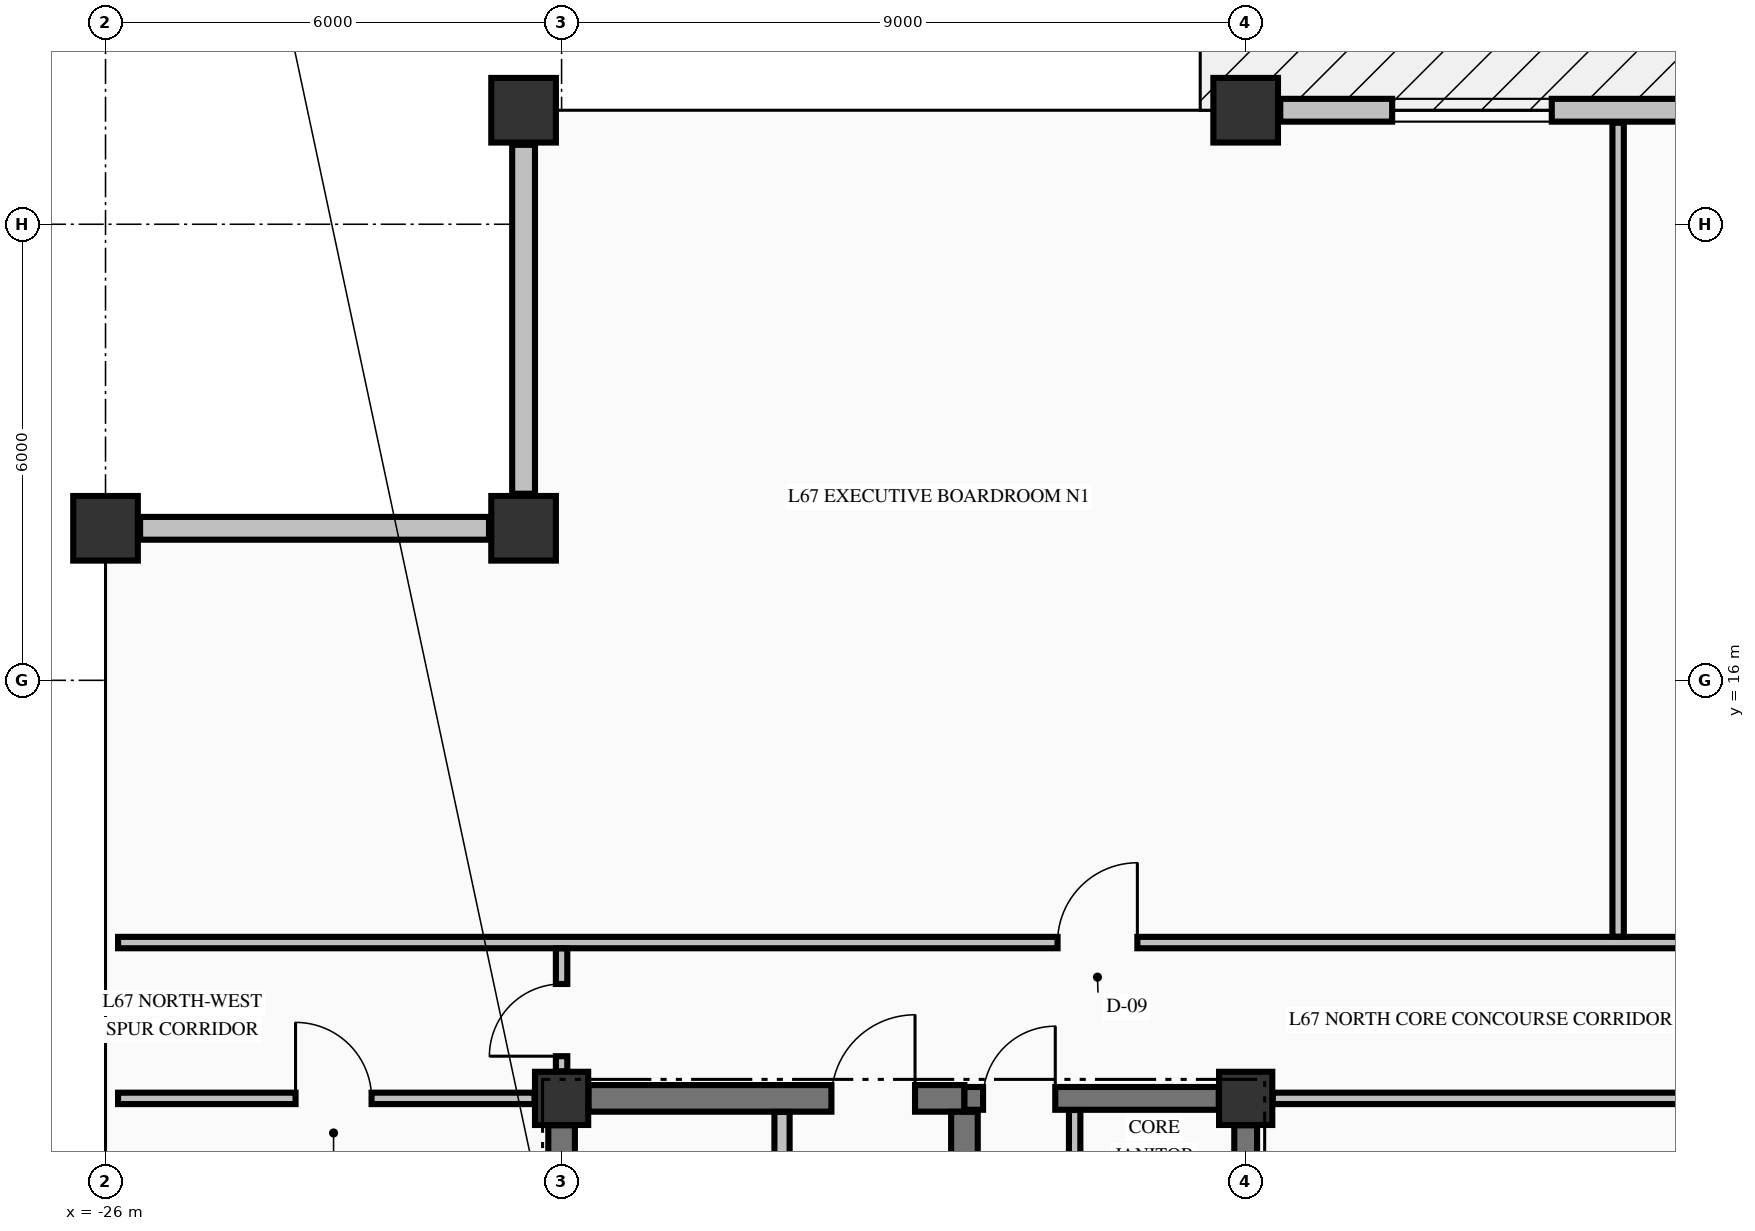
"""IFC4 building model, lengths in metres.
Left out: names, types, materials, properties, quantities, classifications, styles, units other than length and angle.
Written with IfcOpenShell. Run it as: python <this file> out.ifc"""

import sys

from ifc_helpers import new_model, si_unit, direction, frame, frame_2d, origin, origin_2d, place, context, subcontext, project, spatial, rectangle, extrude, element, fill, save


model = new_model("IFC4")
c1 = context("Model", 3, precision=1e-05, world=origin(), true_north=direction((0.0, 1.0)))
c2 = subcontext(c1, "Body", "Model", "MODEL_VIEW")
j1 = project(units=[si_unit("LENGTHUNIT", "METRE"), si_unit("PLANEANGLEUNIT", "RADIAN")], contexts=[c1])
p1 = place(None, origin())
s1 = spatial("IfcSite", under=j1, at=p1, CompositionType="ELEMENT")
p2 = place(p1, origin())
s2 = spatial("IfcBuilding", under=s1, at=p2, CompositionType="ELEMENT")
p3 = place(p2, frame((0.0, 0.0, 254.43)))
s3 = spatial("IfcBuildingStorey", under=s2, at=p3, CompositionType="ELEMENT", Elevation=254.43)
for number, where, z_axis, x_axis in (
    (1, (-20.5, 23.5, -0.425), (0.0, 0.0, 1.0), (1.0, 0.0, 0.0)),
    (2, (-11.0, 23.5, -0.425), (0.0, 0.0, 1.0), (1.0, 0.0, 0.0)),
    (3, (-26.0, 18.0, -0.425), (0.0, 0.0, 1.0), (1.0, 0.0, 0.0)),
    (4, (-20.5, 18.0, -0.425), (0.0, 0.0, 1.0), (1.0, 0.0, 0.0)),
):
    element("IfcColumn", number, at=place(p3, frame(where, z_axis=z_axis, x_axis=x_axis)), inside=s3, PredefinedType="COLUMN", context=c2, shape_type="SweptSolid", body=[
        extrude(rectangle(XDim=0.85, YDim=0.85, at=origin_2d()), origin(), (0.0, 0.0, 1.0), 3.405),
    ])
for number, where, z_axis, x_axis in (
    (5, (-20.0, 10.5, -0.425), (0.0, 0.0, 1.0), (1.0, 0.0, 0.0)),
    (6, (-11.0, 10.5, -0.425), (0.0, 0.0, 1.0), (1.0, 0.0, 0.0)),
):
    element("IfcColumn", number, at=place(p3, frame(where, z_axis=z_axis, x_axis=x_axis)), inside=s3, PredefinedType="COLUMN", context=c2, shape_type="SweptSolid", body=[
        extrude(rectangle(XDim=0.7, YDim=0.7, at=origin_2d()), origin(), (0.0, 0.0, 1.0), 3.405),
    ])
for number, where, z_axis, x_axis in (
    (7, (-20.5, 23.045, 0.0), (0.0, 0.0, 1.0), (0.0, -1.0, 0.0)),
    (8, (-20.955, 18.0, 0.0), (0.0, 0.0, 1.0), (-1.0, 0.0, 0.0)),
):
    element("IfcWall", number, at=place(p3, frame(where, z_axis=z_axis, x_axis=x_axis)), inside=s3, PredefinedType="STANDARD", context=c2, shape_type="SweptSolid", body=[
        extrude(rectangle(XDim=4.59, YDim=0.3, at=frame_2d((2.295, 0.0))), origin(), (0.0, 0.0, 1.0), 1.172),
    ])
p4 = place(p3, frame((-0.455, 23.5, 0.0), z_axis=(0.0, 0.0, 1.0), x_axis=(-1.0, 0.0, 0.0)))
e9 = element("IfcWall", 9, at=p4, inside=s3, PredefinedType="STANDARD", context=c2, shape_type="SweptSolid", body=[
    extrude(rectangle(XDim=10.09, YDim=0.3, at=frame_2d((5.045, 0.0))), origin(), (0.0, 0.0, 1.0), 2.372),
])
p5 = place(p4, frame((0.2, 0.0, 0.0)))
e10 = element("IfcOpeningElement", 10, at=p5, cuts=e9, PredefinedType="OPENING", context=c2, shape_type="SweptSolid", body=[
    extrude(rectangle(XDim=1.1, YDim=2.15, at=frame_2d((0.55, 1.075))), frame((0.0, 0.16, 0.0), z_axis=(0.0, -1.0, 0.0), x_axis=(1.0, 0.0, 0.0)), (0.0, 0.0, 1.0), 0.32),
])
p6 = place(p4, frame((6.518, 0.0, 0.7)))
e11 = element("IfcOpeningElement", 11, at=p6, cuts=e9, PredefinedType="OPENING", context=c2, shape_type="SweptSolid", body=[
    extrude(rectangle(XDim=2.1, YDim=1.5, at=frame_2d((1.05, 0.75))), frame((0.0, 0.16, 0.0), z_axis=(0.0, -1.0, 0.0), x_axis=(1.0, 0.0, 0.0)), (0.0, 0.0, 1.0), 0.32),
])
p7 = place(p3, frame((-19.646, 10.5, 0.0), z_axis=(0.0, 0.0, 1.0), x_axis=(1.0, 0.0, 0.0)))
e12 = element("IfcWall", 12, at=p7, inside=s3, PredefinedType="SHEAR", context=c2, shape_type="SweptSolid", body=[
    extrude(rectangle(XDim=4.946, YDim=0.35, at=frame_2d((2.473, 0.0))), origin(), (0.0, 0.0, 1.0), 2.98),
])
p8 = place(p7, frame((3.196, 0.0, 0.0)))
e13 = element("IfcOpeningElement", 13, at=p8, cuts=e12, PredefinedType="OPENING", context=c2, shape_type="SweptSolid", body=[
    extrude(rectangle(XDim=1.1, YDim=2.15, at=frame_2d((0.55, 1.075))), frame((0.0, 0.185, 0.0), z_axis=(0.0, -1.0, 0.0), x_axis=(1.0, 0.0, 0.0)), (0.0, 0.0, 1.0), 0.37),
])
p9 = place(p3, frame((-14.7, 10.5, 0.0), z_axis=(0.0, 0.0, 1.0), x_axis=(1.0, 0.0, 0.0)))
e14 = element("IfcWall", 14, at=p9, inside=s3, PredefinedType="SHEAR", context=c2, shape_type="SweptSolid", body=[
    extrude(rectangle(XDim=3.346, YDim=0.3, at=frame_2d((1.673, 0.0))), origin(), (0.0, 0.0, 1.0), 2.98),
])
p10 = place(p9, frame((0.245, 0.0, 0.0)))
e15 = element("IfcOpeningElement", 15, at=p10, cuts=e14, PredefinedType="OPENING", context=c2, shape_type="SweptSolid", body=[
    extrude(rectangle(XDim=0.95, YDim=2.15, at=frame_2d((0.475, 1.075))), frame((0.0, 0.16, 0.0), z_axis=(0.0, -1.0, 0.0), x_axis=(1.0, 0.0, 0.0)), (0.0, 0.0, 1.0), 0.32),
])
p11 = place(p3, frame((-25.835, 10.5, 0.0), z_axis=(0.0, 0.0, 1.0), x_axis=(1.0, 0.0, 0.0)))
e16 = element("IfcWall", 16, at=p11, inside=s3, PredefinedType="PARTITIONING", context=c2, shape_type="SweptSolid", body=[
    extrude(rectangle(XDim=5.479, YDim=0.15, at=frame_2d((2.74, 0.0))), origin(), (0.0, 0.0, 1.0), 2.98),
])
p12 = place(p11, frame((2.335, 0.0, 0.0)))
e17 = element("IfcOpeningElement", 17, at=p12, cuts=e16, PredefinedType="OPENING", context=c2, shape_type="SweptSolid", body=[
    extrude(rectangle(XDim=1.0, YDim=2.15, at=frame_2d((0.5, 1.075))), frame((0.0, 0.085, 0.0), z_axis=(0.0, -1.0, 0.0), x_axis=(1.0, 0.0, 0.0)), (0.0, 0.0, 1.0), 0.17),
])
p13 = place(p3, frame((-10.644, 10.5, 0.0), z_axis=(0.0, 0.0, 1.0), x_axis=(1.0, 0.0, 0.0)))
e18 = element("IfcWall", 18, at=p13, inside=s3, PredefinedType="PARTITIONING", context=c2, shape_type="SweptSolid", body=[
    extrude(rectangle(XDim=21.288, YDim=0.15, at=frame_2d((10.644, 0.0))), origin(), (0.0, 0.0, 1.0), 2.98),
])
p14 = place(p13, frame((7.344, 0.0, 0.0)))
e19 = element("IfcOpeningElement", 19, at=p14, cuts=e18, PredefinedType="OPENING", context=c2, shape_type="SweptSolid", body=[
    extrude(rectangle(XDim=1.1, YDim=2.15, at=frame_2d((0.55, 1.075))), frame((0.0, 0.085, 0.0), z_axis=(0.0, -1.0, 0.0), x_axis=(1.0, 0.0, 0.0)), (0.0, 0.0, 1.0), 0.17),
])
p15 = place(p3, frame((-25.835, 12.55, 0.0), z_axis=(0.0, 0.0, 1.0), x_axis=(1.0, 0.0, 0.0)))
e20 = element("IfcWall", 20, at=p15, inside=s3, PredefinedType="PARTITIONING", context=c2, shape_type="SweptSolid", body=[
    extrude(rectangle(XDim=45.91, YDim=0.15, at=frame_2d((22.955, 0.0))), origin(), (0.0, 0.0, 1.0), 2.98),
])
p16 = place(p15, frame((12.36, 0.0, 0.0)))
e21 = element("IfcOpeningElement", 21, at=p16, cuts=e20, PredefinedType="OPENING", context=c2, shape_type="SweptSolid", body=[
    extrude(rectangle(XDim=1.05, YDim=2.15, at=frame_2d((0.525, 1.075))), frame((0.0, 0.085, 0.0), z_axis=(0.0, -1.0, 0.0), x_axis=(1.0, 0.0, 0.0)), (0.0, 0.0, 1.0), 0.17),
])
p17 = place(p15, frame((30.01, 0.0, 0.0)))
e22 = element("IfcOpeningElement", 22, at=p17, cuts=e20, PredefinedType="OPENING", context=c2, shape_type="SweptSolid", body=[
    extrude(rectangle(XDim=1.05, YDim=2.15, at=frame_2d((0.525, 1.075))), frame((0.0, 0.085, 0.0), z_axis=(0.0, -1.0, 0.0), x_axis=(1.0, 0.0, 0.0)), (0.0, 0.0, 1.0), 0.17),
])
p18 = place(p3, frame((-20.0, 5.327, 0.0), z_axis=(0.0, 0.0, 1.0), x_axis=(0.0, 1.0, 0.0)))
e23 = element("IfcWall", 23, at=p18, inside=s3, PredefinedType="SHEAR", context=c2, shape_type="SweptSolid", body=[
    extrude(rectangle(XDim=4.819, YDim=0.35, at=frame_2d((2.41, 0.0))), origin(), (0.0, 0.0, 1.0), 2.98),
])
p19 = place(p3, frame((-14.7, 5.852, 0.0), z_axis=(0.0, 0.0, 1.0), x_axis=(0.0, 1.0, 0.0)))
e24 = element("IfcWall", 24, at=p19, inside=s3, PredefinedType="SHEAR", context=c2, shape_type="SweptSolid", body=[
    extrude(rectangle(XDim=4.471, YDim=0.35, at=frame_2d((2.235, 0.0))), origin(), (0.0, 0.0, 1.0), 2.98),
])
p20 = place(p3, frame((-11.0, 5.852, 0.0), z_axis=(0.0, 0.0, 1.0), x_axis=(0.0, 1.0, 0.0)))
e25 = element("IfcWall", 25, at=p20, inside=s3, PredefinedType="SHEAR", context=c2, shape_type="SweptSolid", body=[
    extrude(rectangle(XDim=4.294, YDim=0.3, at=frame_2d((2.147, 0.0))), origin(), (0.0, 0.0, 1.0), 2.98),
])
p21 = place(p3, frame((-20.0, 10.856, 0.0), z_axis=(0.0, 0.0, 1.0), x_axis=(0.0, 1.0, 0.0)))
e26 = element("IfcWall", 26, at=p21, inside=s3, PredefinedType="PARTITIONING", context=c2, shape_type="SweptSolid", body=[
    extrude(rectangle(XDim=1.616, YDim=0.15, at=frame_2d((0.808, 0.0))), origin(), (0.0, 0.0, 1.0), 2.98),
])
p22 = place(p21, frame((0.199, 0.0, 0.0)))
e27 = element("IfcOpeningElement", 27, at=p22, cuts=e26, PredefinedType="OPENING", context=c2, shape_type="SweptSolid", body=[
    extrude(rectangle(XDim=0.95, YDim=2.15, at=frame_2d((0.475, 1.075))), frame((0.0, 0.085, 0.0), z_axis=(0.0, -1.0, 0.0), x_axis=(1.0, 0.0, 0.0)), (0.0, 0.0, 1.0), 0.17),
])
p23 = place(p3, frame((-17.1, 7.928, 0.0), z_axis=(0.0, 0.0, 1.0), x_axis=(0.0, 1.0, 0.0)))
e28 = element("IfcWall", 28, at=p23, inside=s3, PredefinedType="PARTITIONING", context=c2, shape_type="SweptSolid", body=[
    extrude(rectangle(XDim=2.394, YDim=0.2, at=frame_2d((1.197, 0.0))), origin(), (0.0, 0.0, 1.0), 2.98),
])
p24 = place(p23, frame((0.747, 0.0, 0.0)))
e29 = element("IfcOpeningElement", 29, at=p24, cuts=e28, PredefinedType="OPENING", context=c2, shape_type="SweptSolid", body=[
    extrude(rectangle(XDim=0.95, YDim=2.15, at=frame_2d((0.475, 1.075))), frame((0.0, 0.11, 0.0), z_axis=(0.0, -1.0, 0.0), x_axis=(1.0, 0.0, 0.0)), (0.0, 0.0, 1.0), 0.22),
])
p25 = place(p3, frame((-13.25, 5.853, 0.0), z_axis=(0.0, 0.0, 1.0), x_axis=(0.0, 1.0, 0.0)))
e30 = element("IfcWall", 30, at=p25, inside=s3, PredefinedType="PARTITIONING", context=c2, shape_type="SweptSolid", body=[
    extrude(rectangle(XDim=4.494, YDim=0.15, at=frame_2d((2.247, 0.0))), origin(), (0.0, 0.0, 1.0), 2.98),
])
p26 = place(p25, frame((1.472, 0.0, 0.0)))
e31 = element("IfcOpeningElement", 31, at=p26, cuts=e30, PredefinedType="OPENING", context=c2, shape_type="SweptSolid", body=[
    extrude(rectangle(XDim=0.95, YDim=2.15, at=frame_2d((0.475, 1.075))), frame((0.0, 0.085, 0.0), z_axis=(0.0, -1.0, 0.0), x_axis=(1.0, 0.0, 0.0)), (0.0, 0.0, 1.0), 0.17),
])
p27 = place(p3, frame((-6.1, 12.628, 0.0), z_axis=(0.0, 0.0, 1.0), x_axis=(0.0, 1.0, 0.0)))
e32 = element("IfcWall", 32, at=p27, inside=s3, PredefinedType="PARTITIONING", context=c2, shape_type="SweptSolid", body=[
    extrude(rectangle(XDim=10.707, YDim=0.15, at=frame_2d((5.354, 0.0))), origin(), (0.0, 0.0, 1.0), 2.98),
])
p28 = place(p6, origin())
e33 = element("IfcWindow", 33, at=p28, inside=s3, PartitioningType="SINGLE_PANEL", PredefinedType="WINDOW", context=c2, shape_type="SweptSolid", body=[
    extrude(rectangle(XDim=2.1, YDim=1.5, at=frame_2d((1.05, 0.75))), frame((0.0, 0.03, 0.0), z_axis=(0.0, -1.0, 0.0), x_axis=(1.0, 0.0, 0.0)), (0.0, 0.0, 1.0), 0.06),
])
fill(e11, e33)
p29 = place(p10, origin())
e34 = element("IfcDoor", 34, at=p29, inside=s3, OperationType="SINGLE_SWING_RIGHT", PredefinedType="DOOR", context=c2, shape_type="SweptSolid", body=[
    extrude(rectangle(XDim=0.95, YDim=2.15, at=frame_2d((0.475, 1.075))), frame((0.0, 0.025, 0.0), z_axis=(0.0, -1.0, 0.0), x_axis=(1.0, 0.0, 0.0)), (0.0, 0.0, 1.0), 0.05),
])
fill(e15, e34)
p30 = place(p8, origin())
e35 = element("IfcDoor", 35, at=p30, inside=s3, OperationType="SINGLE_SWING_RIGHT", PredefinedType="DOOR", context=c2, shape_type="SweptSolid", body=[
    extrude(rectangle(XDim=1.1, YDim=2.15, at=frame_2d((0.55, 1.075))), frame((0.0, 0.025, 0.0), z_axis=(0.0, -1.0, 0.0), x_axis=(1.0, 0.0, 0.0)), (0.0, 0.0, 1.0), 0.05),
])
fill(e13, e35)
p31 = place(p16, origin())
e36 = element("IfcDoor", 36, at=p31, inside=s3, OperationType="SINGLE_SWING_RIGHT", PredefinedType="DOOR", context=c2, shape_type="SweptSolid", body=[
    extrude(rectangle(XDim=1.05, YDim=2.15, at=frame_2d((0.525, 1.075))), frame((0.0, 0.025, 0.0), z_axis=(0.0, -1.0, 0.0), x_axis=(1.0, 0.0, 0.0)), (0.0, 0.0, 1.0), 0.05),
])
fill(e21, e36)
p32 = place(p22, origin())
e37 = element("IfcDoor", 37, at=p32, inside=s3, OperationType="SINGLE_SWING_LEFT", PredefinedType="DOOR", context=c2, shape_type="SweptSolid", body=[
    extrude(rectangle(XDim=0.95, YDim=2.15, at=frame_2d((0.475, 1.075))), frame((0.0, 0.025, 0.0), z_axis=(0.0, -1.0, 0.0), x_axis=(1.0, 0.0, 0.0)), (0.0, 0.0, 1.0), 0.05),
])
fill(e27, e37)
p33 = place(p12, origin())
e38 = element("IfcDoor", 38, at=p33, inside=s3, OperationType="SINGLE_SWING_LEFT", PredefinedType="DOOR", context=c2, shape_type="SweptSolid", body=[
    extrude(rectangle(XDim=1.0, YDim=2.15, at=frame_2d((0.5, 1.075))), frame((0.0, 0.025, 0.0), z_axis=(0.0, -1.0, 0.0), x_axis=(1.0, 0.0, 0.0)), (0.0, 0.0, 1.0), 0.05),
])
fill(e17, e38)
save(model, sys.argv[1])
